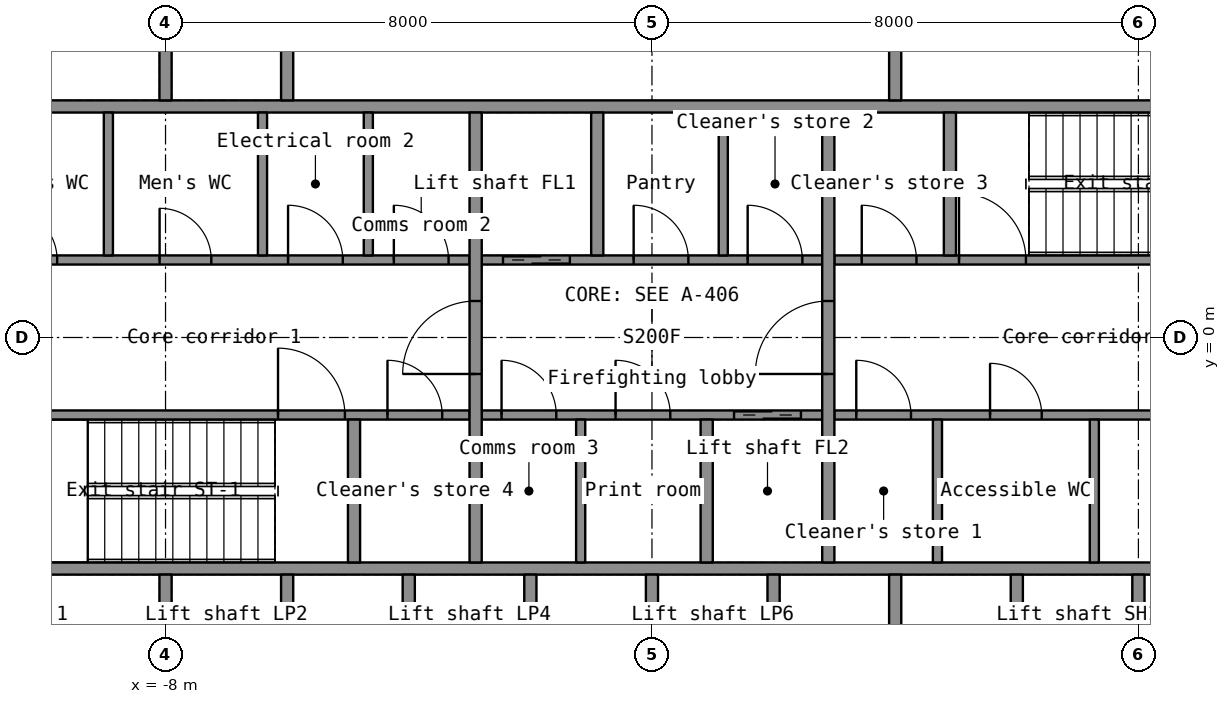
"""IFC4 building model, lengths in metres.
Left out: names, types, materials, properties, quantities, classifications, styles, units other than length and angle.
Written with IfcOpenShell. Run it as: python <this file> out.ifc"""

import sys

from ifc_helpers import new_model, si_unit, direction, frame, frame_2d, origin, place, context, subcontext, project, spatial, rectangle, extrude, element, fill, save


model = new_model("IFC4")
c1 = context("Model", 3, precision=1e-05, world=origin(), true_north=direction((0.0, 1.0)))
c2 = subcontext(c1, "Body", "Model", "MODEL_VIEW")
j1 = project(units=[si_unit("LENGTHUNIT", "METRE"), si_unit("PLANEANGLEUNIT", "RADIAN")], contexts=[c1])
p1 = place(None, origin())
s1 = spatial("IfcSite", under=j1, at=p1, CompositionType="ELEMENT")
p2 = place(p1, origin())
s2 = spatial("IfcBuilding", under=s1, at=p2, CompositionType="ELEMENT")
p3 = place(p2, frame((0.0, 0.0, 24.5)))
s3 = spatial("IfcBuildingStorey", under=s2, at=p3, CompositionType="ELEMENT", Elevation=24.5)
for number, where, z_axis, x_axis in (
    (1, (-11.4, -3.8, 0.0), (0.0, 0.0, 1.0), (1.0, 0.0, 0.0)),
    (2, (-11.4, 3.8, 0.0), (0.0, 0.0, 1.0), (1.0, 0.0, 0.0)),
):
    element("IfcWall", number, at=place(p3, frame(where, z_axis=z_axis, x_axis=x_axis)), inside=s3, PredefinedType="SHEAR", context=c2, shape_type="SweptSolid", body=[
        extrude(rectangle(XDim=22.8, YDim=0.2, at=frame_2d((11.4, 0.0))), origin(), (0.0, 0.0, 1.0), 3.8),
    ])
for number, where, z_axis, x_axis in (
    (3, (-8.0, -6.6, 0.0), (0.0, 0.0, 1.0), (0.0, 1.0, 0.0)),
    (4, (-6.0, -6.6, 0.0), (0.0, 0.0, 1.0), (0.0, 1.0, 0.0)),
    (5, (-4.0, -6.6, 0.0), (0.0, 0.0, 1.0), (0.0, 1.0, 0.0)),
    (6, (-2.0, -6.6, 0.0), (0.0, 0.0, 1.0), (0.0, 1.0, 0.0)),
    (7, (0.0, -6.6, 0.0), (0.0, 0.0, 1.0), (0.0, 1.0, 0.0)),
    (8, (2.0, -6.6, 0.0), (0.0, 0.0, 1.0), (0.0, 1.0, 0.0)),
    (9, (4.0, -6.6, 0.0), (0.0, 0.0, 1.0), (0.0, 1.0, 0.0)),
    (10, (6.0, -6.6, 0.0), (0.0, 0.0, 1.0), (0.0, 1.0, 0.0)),
    (11, (8.0, -6.6, 0.0), (0.0, 0.0, 1.0), (0.0, 1.0, 0.0)),
    (12, (-8.0, 3.9, 0.0), (0.0, 0.0, 1.0), (0.0, 1.0, 0.0)),
    (13, (-6.0, 3.9, 0.0), (0.0, 0.0, 1.0), (0.0, 1.0, 0.0)),
):
    element("IfcWall", number, at=place(p3, frame(where, z_axis=z_axis, x_axis=x_axis)), inside=s3, PredefinedType="SHEAR", context=c2, shape_type="SweptSolid", body=[
        extrude(rectangle(XDim=2.7, YDim=0.2, at=frame_2d((1.35, 0.0))), origin(), (0.0, 0.0, 1.0), 3.8),
    ])
p4 = place(p3, frame((4.0, 3.9, 0.0), z_axis=(0.0, 0.0, 1.0), x_axis=(0.0, 1.0, 0.0)))
e14 = element("IfcWall", 14, at=p4, inside=s3, PredefinedType="PARTITIONING", context=c2, shape_type="SweptSolid", body=[
    extrude(rectangle(XDim=2.7, YDim=0.2, at=frame_2d((1.35, 0.0))), origin(), (0.0, 0.0, 1.0), 3.8),
])
p5 = place(p3, frame((-11.4, -1.275, 0.0), z_axis=(0.0, 0.0, 1.0), x_axis=(1.0, 0.0, 0.0)))
e15 = element("IfcWall", 15, at=p5, inside=s3, PredefinedType="SHEAR", context=c2, shape_type="SweptSolid", body=[
    extrude(rectangle(XDim=8.4, YDim=0.15, at=frame_2d((4.2, 0.0))), origin(), (0.0, 0.0, 1.0), 3.8),
])
p6 = place(p5, frame((5.25, 0.0, 0.0)))
e16 = element("IfcOpeningElement", 16, at=p6, cuts=e15, PredefinedType="OPENING", context=c2, shape_type="SweptSolid", body=[
    extrude(rectangle(XDim=1.1, YDim=2.15, at=frame_2d((0.55, 1.075))), frame((0.0, 0.085, 0.0), z_axis=(0.0, -1.0, 0.0), x_axis=(1.0, 0.0, 0.0)), (0.0, 0.0, 1.0), 0.17),
])
p7 = place(p5, frame((7.05, 0.0, 0.0)))
e17 = element("IfcOpeningElement", 17, at=p7, cuts=e15, PredefinedType="OPENING", context=c2, shape_type="SweptSolid", body=[
    extrude(rectangle(XDim=0.9, YDim=2.1, at=frame_2d((0.45, 1.05))), frame((0.0, 0.085, 0.0), z_axis=(0.0, -1.0, 0.0), x_axis=(1.0, 0.0, 0.0)), (0.0, 0.0, 1.0), 0.17),
])
p8 = place(p3, frame((-2.8, -1.275, 0.0), z_axis=(0.0, 0.0, 1.0), x_axis=(1.0, 0.0, 0.0)))
e18 = element("IfcWall", 18, at=p8, inside=s3, PredefinedType="SHEAR", context=c2, shape_type="SweptSolid", body=[
    extrude(rectangle(XDim=5.6, YDim=0.15, at=frame_2d((2.8, 0.0))), origin(), (0.0, 0.0, 1.0), 3.8),
])
p9 = place(p8, frame((4.15, 0.0, 0.0)))
e19 = element("IfcOpeningElement", 19, at=p9, cuts=e18, PredefinedType="OPENING", context=c2, shape_type="SweptSolid", body=[
    extrude(rectangle(XDim=1.1, YDim=2.2, at=frame_2d((0.55, 1.1))), frame((0.0, 0.085, 0.0), z_axis=(0.0, -1.0, 0.0), x_axis=(1.0, 0.0, 0.0)), (0.0, 0.0, 1.0), 0.17),
])
p10 = place(p8, frame((0.326, 0.0, 0.0)))
e20 = element("IfcOpeningElement", 20, at=p10, cuts=e18, PredefinedType="OPENING", context=c2, shape_type="SweptSolid", body=[
    extrude(rectangle(XDim=0.9, YDim=2.1, at=frame_2d((0.45, 1.05))), frame((0.0, 0.085, 0.0), z_axis=(0.0, -1.0, 0.0), x_axis=(1.0, 0.0, 0.0)), (0.0, 0.0, 1.0), 0.17),
])
p11 = place(p8, frame((2.201, 0.0, 0.0)))
e21 = element("IfcOpeningElement", 21, at=p11, cuts=e18, PredefinedType="OPENING", context=c2, shape_type="SweptSolid", body=[
    extrude(rectangle(XDim=0.9, YDim=2.1, at=frame_2d((0.45, 1.05))), frame((0.0, 0.085, 0.0), z_axis=(0.0, -1.0, 0.0), x_axis=(1.0, 0.0, 0.0)), (0.0, 0.0, 1.0), 0.17),
])
p12 = place(p3, frame((3.0, -1.275, 0.0), z_axis=(0.0, 0.0, 1.0), x_axis=(1.0, 0.0, 0.0)))
e22 = element("IfcWall", 22, at=p12, inside=s3, PredefinedType="PARTITIONING", context=c2, shape_type="SweptSolid", body=[
    extrude(rectangle(XDim=8.4, YDim=0.15, at=frame_2d((4.2, 0.0))), origin(), (0.0, 0.0, 1.0), 3.8),
])
p13 = place(p12, frame((0.36, 0.0, 0.0)))
e23 = element("IfcOpeningElement", 23, at=p13, cuts=e22, PredefinedType="OPENING", context=c2, shape_type="SweptSolid", body=[
    extrude(rectangle(XDim=0.9, YDim=2.1, at=frame_2d((0.45, 1.05))), frame((0.0, 0.085, 0.0), z_axis=(0.0, -1.0, 0.0), x_axis=(1.0, 0.0, 0.0)), (0.0, 0.0, 1.0), 0.17),
])
p14 = place(p12, frame((2.56, 0.0, 0.0)))
e24 = element("IfcOpeningElement", 24, at=p14, cuts=e22, PredefinedType="OPENING", context=c2, shape_type="SweptSolid", body=[
    extrude(rectangle(XDim=0.85, YDim=2.1, at=frame_2d((0.425, 1.05))), frame((0.0, 0.085, 0.0), z_axis=(0.0, -1.0, 0.0), x_axis=(1.0, 0.0, 0.0)), (0.0, 0.0, 1.0), 0.17),
])
p15 = place(p12, frame((5.95, 0.0, 0.0)))
e25 = element("IfcOpeningElement", 25, at=p15, cuts=e22, PredefinedType="OPENING", context=c2, shape_type="SweptSolid", body=[
    extrude(rectangle(XDim=0.85, YDim=2.1, at=frame_2d((0.425, 1.05))), frame((0.0, 0.085, 0.0), z_axis=(0.0, -1.0, 0.0), x_axis=(1.0, 0.0, 0.0)), (0.0, 0.0, 1.0), 0.17),
])
p16 = place(p3, frame((-11.4, 1.275, 0.0), z_axis=(0.0, 0.0, 1.0), x_axis=(1.0, 0.0, 0.0)))
e26 = element("IfcWall", 26, at=p16, inside=s3, PredefinedType="PARTITIONING", context=c2, shape_type="SweptSolid", body=[
    extrude(rectangle(XDim=8.4, YDim=0.15, at=frame_2d((4.2, 0.0))), origin(), (0.0, 0.0, 1.0), 3.8),
])
p17 = place(p16, frame((0.768, 0.0, 0.0)))
e27 = element("IfcOpeningElement", 27, at=p17, cuts=e26, PredefinedType="OPENING", context=c2, shape_type="SweptSolid", body=[
    extrude(rectangle(XDim=0.85, YDim=2.1, at=frame_2d((0.425, 1.05))), frame((0.0, 0.085, 0.0), z_axis=(0.0, -1.0, 0.0), x_axis=(1.0, 0.0, 0.0)), (0.0, 0.0, 1.0), 0.17),
])
p18 = place(p16, frame((3.302, 0.0, 0.0)))
e28 = element("IfcOpeningElement", 28, at=p18, cuts=e26, PredefinedType="OPENING", context=c2, shape_type="SweptSolid", body=[
    extrude(rectangle(XDim=0.85, YDim=2.1, at=frame_2d((0.425, 1.05))), frame((0.0, 0.085, 0.0), z_axis=(0.0, -1.0, 0.0), x_axis=(1.0, 0.0, 0.0)), (0.0, 0.0, 1.0), 0.17),
])
p19 = place(p16, frame((5.415, 0.0, 0.0)))
e29 = element("IfcOpeningElement", 29, at=p19, cuts=e26, PredefinedType="OPENING", context=c2, shape_type="SweptSolid", body=[
    extrude(rectangle(XDim=0.9, YDim=2.1, at=frame_2d((0.45, 1.05))), frame((0.0, 0.085, 0.0), z_axis=(0.0, -1.0, 0.0), x_axis=(1.0, 0.0, 0.0)), (0.0, 0.0, 1.0), 0.17),
])
p20 = place(p16, frame((7.155, 0.0, 0.0)))
e30 = element("IfcOpeningElement", 30, at=p20, cuts=e26, PredefinedType="OPENING", context=c2, shape_type="SweptSolid", body=[
    extrude(rectangle(XDim=0.9, YDim=2.1, at=frame_2d((0.45, 1.05))), frame((0.0, 0.085, 0.0), z_axis=(0.0, -1.0, 0.0), x_axis=(1.0, 0.0, 0.0)), (0.0, 0.0, 1.0), 0.17),
])
p21 = place(p3, frame((-2.8, 1.275, 0.0), z_axis=(0.0, 0.0, 1.0), x_axis=(1.0, 0.0, 0.0)))
e31 = element("IfcWall", 31, at=p21, inside=s3, PredefinedType="SHEAR", context=c2, shape_type="SweptSolid", body=[
    extrude(rectangle(XDim=5.6, YDim=0.15, at=frame_2d((2.8, 0.0))), origin(), (0.0, 0.0, 1.0), 3.8),
])
p22 = place(p21, frame((0.35, 0.0, 0.0)))
e32 = element("IfcOpeningElement", 32, at=p22, cuts=e31, PredefinedType="OPENING", context=c2, shape_type="SweptSolid", body=[
    extrude(rectangle(XDim=1.1, YDim=2.2, at=frame_2d((0.55, 1.1))), frame((0.0, 0.085, 0.0), z_axis=(0.0, -1.0, 0.0), x_axis=(1.0, 0.0, 0.0)), (0.0, 0.0, 1.0), 0.17),
])
p23 = place(p21, frame((2.499, 0.0, 0.0)))
e33 = element("IfcOpeningElement", 33, at=p23, cuts=e31, PredefinedType="OPENING", context=c2, shape_type="SweptSolid", body=[
    extrude(rectangle(XDim=0.9, YDim=2.1, at=frame_2d((0.45, 1.05))), frame((0.0, 0.085, 0.0), z_axis=(0.0, -1.0, 0.0), x_axis=(1.0, 0.0, 0.0)), (0.0, 0.0, 1.0), 0.17),
])
p24 = place(p21, frame((4.374, 0.0, 0.0)))
e34 = element("IfcOpeningElement", 34, at=p24, cuts=e31, PredefinedType="OPENING", context=c2, shape_type="SweptSolid", body=[
    extrude(rectangle(XDim=0.9, YDim=2.1, at=frame_2d((0.45, 1.05))), frame((0.0, 0.085, 0.0), z_axis=(0.0, -1.0, 0.0), x_axis=(1.0, 0.0, 0.0)), (0.0, 0.0, 1.0), 0.17),
])
p25 = place(p3, frame((3.0, 1.275, 0.0), z_axis=(0.0, 0.0, 1.0), x_axis=(1.0, 0.0, 0.0)))
e35 = element("IfcWall", 35, at=p25, inside=s3, PredefinedType="SHEAR", context=c2, shape_type="SweptSolid", body=[
    extrude(rectangle(XDim=8.4, YDim=0.15, at=frame_2d((4.2, 0.0))), origin(), (0.0, 0.0, 1.0), 3.8),
])
p26 = place(p25, frame((2.05, 0.0, 0.0)))
e36 = element("IfcOpeningElement", 36, at=p26, cuts=e35, PredefinedType="OPENING", context=c2, shape_type="SweptSolid", body=[
    extrude(rectangle(XDim=1.1, YDim=2.15, at=frame_2d((0.55, 1.075))), frame((0.0, 0.085, 0.0), z_axis=(0.0, -1.0, 0.0), x_axis=(1.0, 0.0, 0.0)), (0.0, 0.0, 1.0), 0.17),
])
p27 = place(p25, frame((0.45, 0.0, 0.0)))
e37 = element("IfcOpeningElement", 37, at=p27, cuts=e35, PredefinedType="OPENING", context=c2, shape_type="SweptSolid", body=[
    extrude(rectangle(XDim=0.9, YDim=2.1, at=frame_2d((0.45, 1.05))), frame((0.0, 0.085, 0.0), z_axis=(0.0, -1.0, 0.0), x_axis=(1.0, 0.0, 0.0)), (0.0, 0.0, 1.0), 0.17),
])
p28 = place(p3, frame((-2.9, -3.7, 0.0), z_axis=(0.0, 0.0, 1.0), x_axis=(0.0, 1.0, 0.0)))
e38 = element("IfcWall", 38, at=p28, inside=s3, PredefinedType="SHEAR", context=c2, shape_type="SweptSolid", body=[
    extrude(rectangle(XDim=7.4, YDim=0.2, at=frame_2d((3.7, 0.0))), origin(), (0.0, 0.0, 1.0), 3.8),
])
p29 = place(p28, frame((3.1, 0.0, 0.0)))
e39 = element("IfcOpeningElement", 39, at=p29, cuts=e38, PredefinedType="OPENING", context=c2, shape_type="SweptSolid", body=[
    extrude(rectangle(XDim=1.2, YDim=2.2, at=frame_2d((0.6, 1.1))), frame((0.0, 0.11, 0.0), z_axis=(0.0, -1.0, 0.0), x_axis=(1.0, 0.0, 0.0)), (0.0, 0.0, 1.0), 0.22),
])
p30 = place(p3, frame((2.9, -3.7, 0.0), z_axis=(0.0, 0.0, 1.0), x_axis=(0.0, 1.0, 0.0)))
e40 = element("IfcWall", 40, at=p30, inside=s3, PredefinedType="SHEAR", context=c2, shape_type="SweptSolid", body=[
    extrude(rectangle(XDim=7.4, YDim=0.2, at=frame_2d((3.7, 0.0))), origin(), (0.0, 0.0, 1.0), 3.8),
])
p31 = place(p30, frame((3.1, 0.0, 0.0)))
e41 = element("IfcOpeningElement", 41, at=p31, cuts=e40, PredefinedType="OPENING", context=c2, shape_type="SweptSolid", body=[
    extrude(rectangle(XDim=1.2, YDim=2.2, at=frame_2d((0.6, 1.1))), frame((0.0, 0.11, 0.0), z_axis=(0.0, -1.0, 0.0), x_axis=(1.0, 0.0, 0.0)), (0.0, 0.0, 1.0), 0.22),
])
for number, where, z_axis, x_axis in (
    (42, (-0.9, 1.35, 0.0), (0.0, 0.0, 1.0), (0.0, 1.0, 0.0)),
    (43, (0.9, -3.7, 0.0), (0.0, 0.0, 1.0), (0.0, 1.0, 0.0)),
    (44, (-4.9, -3.7, 0.0), (0.0, 0.0, 1.0), (0.0, 1.0, 0.0)),
    (45, (4.9, 1.35, 0.0), (0.0, 0.0, 1.0), (0.0, 1.0, 0.0)),
):
    element("IfcWall", number, at=place(p3, frame(where, z_axis=z_axis, x_axis=x_axis)), inside=s3, PredefinedType="SHEAR", context=c2, shape_type="SweptSolid", body=[
        extrude(rectangle(XDim=2.35, YDim=0.2, at=frame_2d((1.175, 0.0))), origin(), (0.0, 0.0, 1.0), 3.8),
    ])
for number, where, z_axis, x_axis in (
    (46, (-8.94, 1.35, 0.0), (0.0, 0.0, 1.0), (0.0, 1.0, 0.0)),
    (47, (-6.405, 1.35, 0.0), (0.0, 0.0, 1.0), (0.0, 1.0, 0.0)),
    (48, (-4.665, 1.35, 0.0), (0.0, 0.0, 1.0), (0.0, 1.0, 0.0)),
    (49, (4.695, -3.7, 0.0), (0.0, 0.0, 1.0), (0.0, 1.0, 0.0)),
    (50, (7.275, -3.7, 0.0), (0.0, 0.0, 1.0), (0.0, 1.0, 0.0)),
    (51, (1.173, 1.35, 0.0), (0.0, 0.0, 1.0), (0.0, 1.0, 0.0)),
    (52, (-1.173, -3.7, 0.0), (0.0, 0.0, 1.0), (0.0, 1.0, 0.0)),
):
    element("IfcWall", number, at=place(p3, frame(where, z_axis=z_axis, x_axis=x_axis)), inside=s3, PredefinedType="PARTITIONING", context=c2, shape_type="SweptSolid", body=[
        extrude(rectangle(XDim=2.35, YDim=0.15, at=frame_2d((1.175, 0.0))), origin(), (0.0, 0.0, 1.0), 3.8),
    ])
p32 = place(p29, origin())
e53 = element("IfcDoor", 53, at=p32, inside=s3, OperationType="SINGLE_SWING_LEFT", PredefinedType="DOOR", context=c2, shape_type="SweptSolid", body=[
    extrude(rectangle(XDim=1.2, YDim=2.2, at=frame_2d((0.6, 1.1))), frame((0.0, 0.025, 0.0), z_axis=(0.0, -1.0, 0.0), x_axis=(1.0, 0.0, 0.0)), (0.0, 0.0, 1.0), 0.05),
])
fill(e39, e53)
p33 = place(p31, origin())
e54 = element("IfcDoor", 54, at=p33, inside=s3, OperationType="SINGLE_SWING_LEFT", PredefinedType="DOOR", context=c2, shape_type="SweptSolid", body=[
    extrude(rectangle(XDim=1.2, YDim=2.2, at=frame_2d((0.6, 1.1))), frame((0.0, 0.025, 0.0), z_axis=(0.0, -1.0, 0.0), x_axis=(1.0, 0.0, 0.0)), (0.0, 0.0, 1.0), 0.05),
])
fill(e41, e54)
p34 = place(p22, origin())
e55 = element("IfcDoor", 55, at=p34, inside=s3, OperationType="DOUBLE_DOOR_SLIDING", PredefinedType="DOOR", context=c2, shape_type="SweptSolid", body=[
    extrude(rectangle(XDim=1.1, YDim=2.2, at=frame_2d((0.55, 1.1))), frame((0.0, 0.025, 0.0), z_axis=(0.0, -1.0, 0.0), x_axis=(1.0, 0.0, 0.0)), (0.0, 0.0, 1.0), 0.05),
])
fill(e32, e55)
p35 = place(p9, origin())
e56 = element("IfcDoor", 56, at=p35, inside=s3, OperationType="DOUBLE_DOOR_SLIDING", PredefinedType="DOOR", context=c2, shape_type="SweptSolid", body=[
    extrude(rectangle(XDim=1.1, YDim=2.2, at=frame_2d((0.55, 1.1))), frame((0.0, 0.025, 0.0), z_axis=(0.0, -1.0, 0.0), x_axis=(1.0, 0.0, 0.0)), (0.0, 0.0, 1.0), 0.05),
])
fill(e19, e56)
p36 = place(p6, origin())
e57 = element("IfcDoor", 57, at=p36, inside=s3, OperationType="SINGLE_SWING_LEFT", PredefinedType="DOOR", context=c2, shape_type="SweptSolid", body=[
    extrude(rectangle(XDim=1.1, YDim=2.15, at=frame_2d((0.55, 1.075))), frame((0.0, 0.025, 0.0), z_axis=(0.0, -1.0, 0.0), x_axis=(1.0, 0.0, 0.0)), (0.0, 0.0, 1.0), 0.05),
])
fill(e16, e57)
p37 = place(p26, origin())
e58 = element("IfcDoor", 58, at=p37, inside=s3, OperationType="SINGLE_SWING_LEFT", PredefinedType="DOOR", context=c2, shape_type="SweptSolid", body=[
    extrude(rectangle(XDim=1.1, YDim=2.15, at=frame_2d((0.55, 1.075))), frame((0.0, 0.025, 0.0), z_axis=(0.0, -1.0, 0.0), x_axis=(1.0, 0.0, 0.0)), (0.0, 0.0, 1.0), 0.05),
])
fill(e36, e58)
p38 = place(p17, origin())
e59 = element("IfcDoor", 59, at=p38, inside=s3, OperationType="SINGLE_SWING_LEFT", PredefinedType="DOOR", context=c2, shape_type="SweptSolid", body=[
    extrude(rectangle(XDim=0.85, YDim=2.1, at=frame_2d((0.425, 1.05))), frame((0.0, 0.025, 0.0), z_axis=(0.0, -1.0, 0.0), x_axis=(1.0, 0.0, 0.0)), (0.0, 0.0, 1.0), 0.05),
])
fill(e27, e59)
p39 = place(p18, origin())
e60 = element("IfcDoor", 60, at=p39, inside=s3, OperationType="SINGLE_SWING_LEFT", PredefinedType="DOOR", context=c2, shape_type="SweptSolid", body=[
    extrude(rectangle(XDim=0.85, YDim=2.1, at=frame_2d((0.425, 1.05))), frame((0.0, 0.025, 0.0), z_axis=(0.0, -1.0, 0.0), x_axis=(1.0, 0.0, 0.0)), (0.0, 0.0, 1.0), 0.05),
])
fill(e28, e60)
p40 = place(p19, origin())
e61 = element("IfcDoor", 61, at=p40, inside=s3, OperationType="SINGLE_SWING_LEFT", PredefinedType="DOOR", context=c2, shape_type="SweptSolid", body=[
    extrude(rectangle(XDim=0.9, YDim=2.1, at=frame_2d((0.45, 1.05))), frame((0.0, 0.025, 0.0), z_axis=(0.0, -1.0, 0.0), x_axis=(1.0, 0.0, 0.0)), (0.0, 0.0, 1.0), 0.05),
])
fill(e29, e61)
p41 = place(p20, origin())
e62 = element("IfcDoor", 62, at=p41, inside=s3, OperationType="SINGLE_SWING_LEFT", PredefinedType="DOOR", context=c2, shape_type="SweptSolid", body=[
    extrude(rectangle(XDim=0.9, YDim=2.1, at=frame_2d((0.45, 1.05))), frame((0.0, 0.025, 0.0), z_axis=(0.0, -1.0, 0.0), x_axis=(1.0, 0.0, 0.0)), (0.0, 0.0, 1.0), 0.05),
])
fill(e30, e62)
p42 = place(p13, origin())
e63 = element("IfcDoor", 63, at=p42, inside=s3, OperationType="SINGLE_SWING_LEFT", PredefinedType="DOOR", context=c2, shape_type="SweptSolid", body=[
    extrude(rectangle(XDim=0.9, YDim=2.1, at=frame_2d((0.45, 1.05))), frame((0.0, 0.025, 0.0), z_axis=(0.0, -1.0, 0.0), x_axis=(1.0, 0.0, 0.0)), (0.0, 0.0, 1.0), 0.05),
])
fill(e23, e63)
p43 = place(p14, origin())
e64 = element("IfcDoor", 64, at=p43, inside=s3, OperationType="SINGLE_SWING_LEFT", PredefinedType="DOOR", context=c2, shape_type="SweptSolid", body=[
    extrude(rectangle(XDim=0.85, YDim=2.1, at=frame_2d((0.425, 1.05))), frame((0.0, 0.025, 0.0), z_axis=(0.0, -1.0, 0.0), x_axis=(1.0, 0.0, 0.0)), (0.0, 0.0, 1.0), 0.05),
])
fill(e24, e64)
p44 = place(p23, origin())
e65 = element("IfcDoor", 65, at=p44, inside=s3, OperationType="SINGLE_SWING_LEFT", PredefinedType="DOOR", context=c2, shape_type="SweptSolid", body=[
    extrude(rectangle(XDim=0.9, YDim=2.1, at=frame_2d((0.45, 1.05))), frame((0.0, 0.025, 0.0), z_axis=(0.0, -1.0, 0.0), x_axis=(1.0, 0.0, 0.0)), (0.0, 0.0, 1.0), 0.05),
])
fill(e33, e65)
p45 = place(p24, origin())
e66 = element("IfcDoor", 66, at=p45, inside=s3, OperationType="SINGLE_SWING_LEFT", PredefinedType="DOOR", context=c2, shape_type="SweptSolid", body=[
    extrude(rectangle(XDim=0.9, YDim=2.1, at=frame_2d((0.45, 1.05))), frame((0.0, 0.025, 0.0), z_axis=(0.0, -1.0, 0.0), x_axis=(1.0, 0.0, 0.0)), (0.0, 0.0, 1.0), 0.05),
])
fill(e34, e66)
p46 = place(p10, origin())
e67 = element("IfcDoor", 67, at=p46, inside=s3, OperationType="SINGLE_SWING_LEFT", PredefinedType="DOOR", context=c2, shape_type="SweptSolid", body=[
    extrude(rectangle(XDim=0.9, YDim=2.1, at=frame_2d((0.45, 1.05))), frame((0.0, 0.025, 0.0), z_axis=(0.0, -1.0, 0.0), x_axis=(1.0, 0.0, 0.0)), (0.0, 0.0, 1.0), 0.05),
])
fill(e20, e67)
p47 = place(p11, origin())
e68 = element("IfcDoor", 68, at=p47, inside=s3, OperationType="SINGLE_SWING_LEFT", PredefinedType="DOOR", context=c2, shape_type="SweptSolid", body=[
    extrude(rectangle(XDim=0.9, YDim=2.1, at=frame_2d((0.45, 1.05))), frame((0.0, 0.025, 0.0), z_axis=(0.0, -1.0, 0.0), x_axis=(1.0, 0.0, 0.0)), (0.0, 0.0, 1.0), 0.05),
])
fill(e21, e68)
p48 = place(p27, origin())
e69 = element("IfcDoor", 69, at=p48, inside=s3, OperationType="SINGLE_SWING_LEFT", PredefinedType="DOOR", context=c2, shape_type="SweptSolid", body=[
    extrude(rectangle(XDim=0.9, YDim=2.1, at=frame_2d((0.45, 1.05))), frame((0.0, 0.025, 0.0), z_axis=(0.0, -1.0, 0.0), x_axis=(1.0, 0.0, 0.0)), (0.0, 0.0, 1.0), 0.05),
])
fill(e37, e69)
p49 = place(p7, origin())
e70 = element("IfcDoor", 70, at=p49, inside=s3, OperationType="SINGLE_SWING_LEFT", PredefinedType="DOOR", context=c2, shape_type="SweptSolid", body=[
    extrude(rectangle(XDim=0.9, YDim=2.1, at=frame_2d((0.45, 1.05))), frame((0.0, 0.025, 0.0), z_axis=(0.0, -1.0, 0.0), x_axis=(1.0, 0.0, 0.0)), (0.0, 0.0, 1.0), 0.05),
])
fill(e17, e70)
save(model, sys.argv[1])
